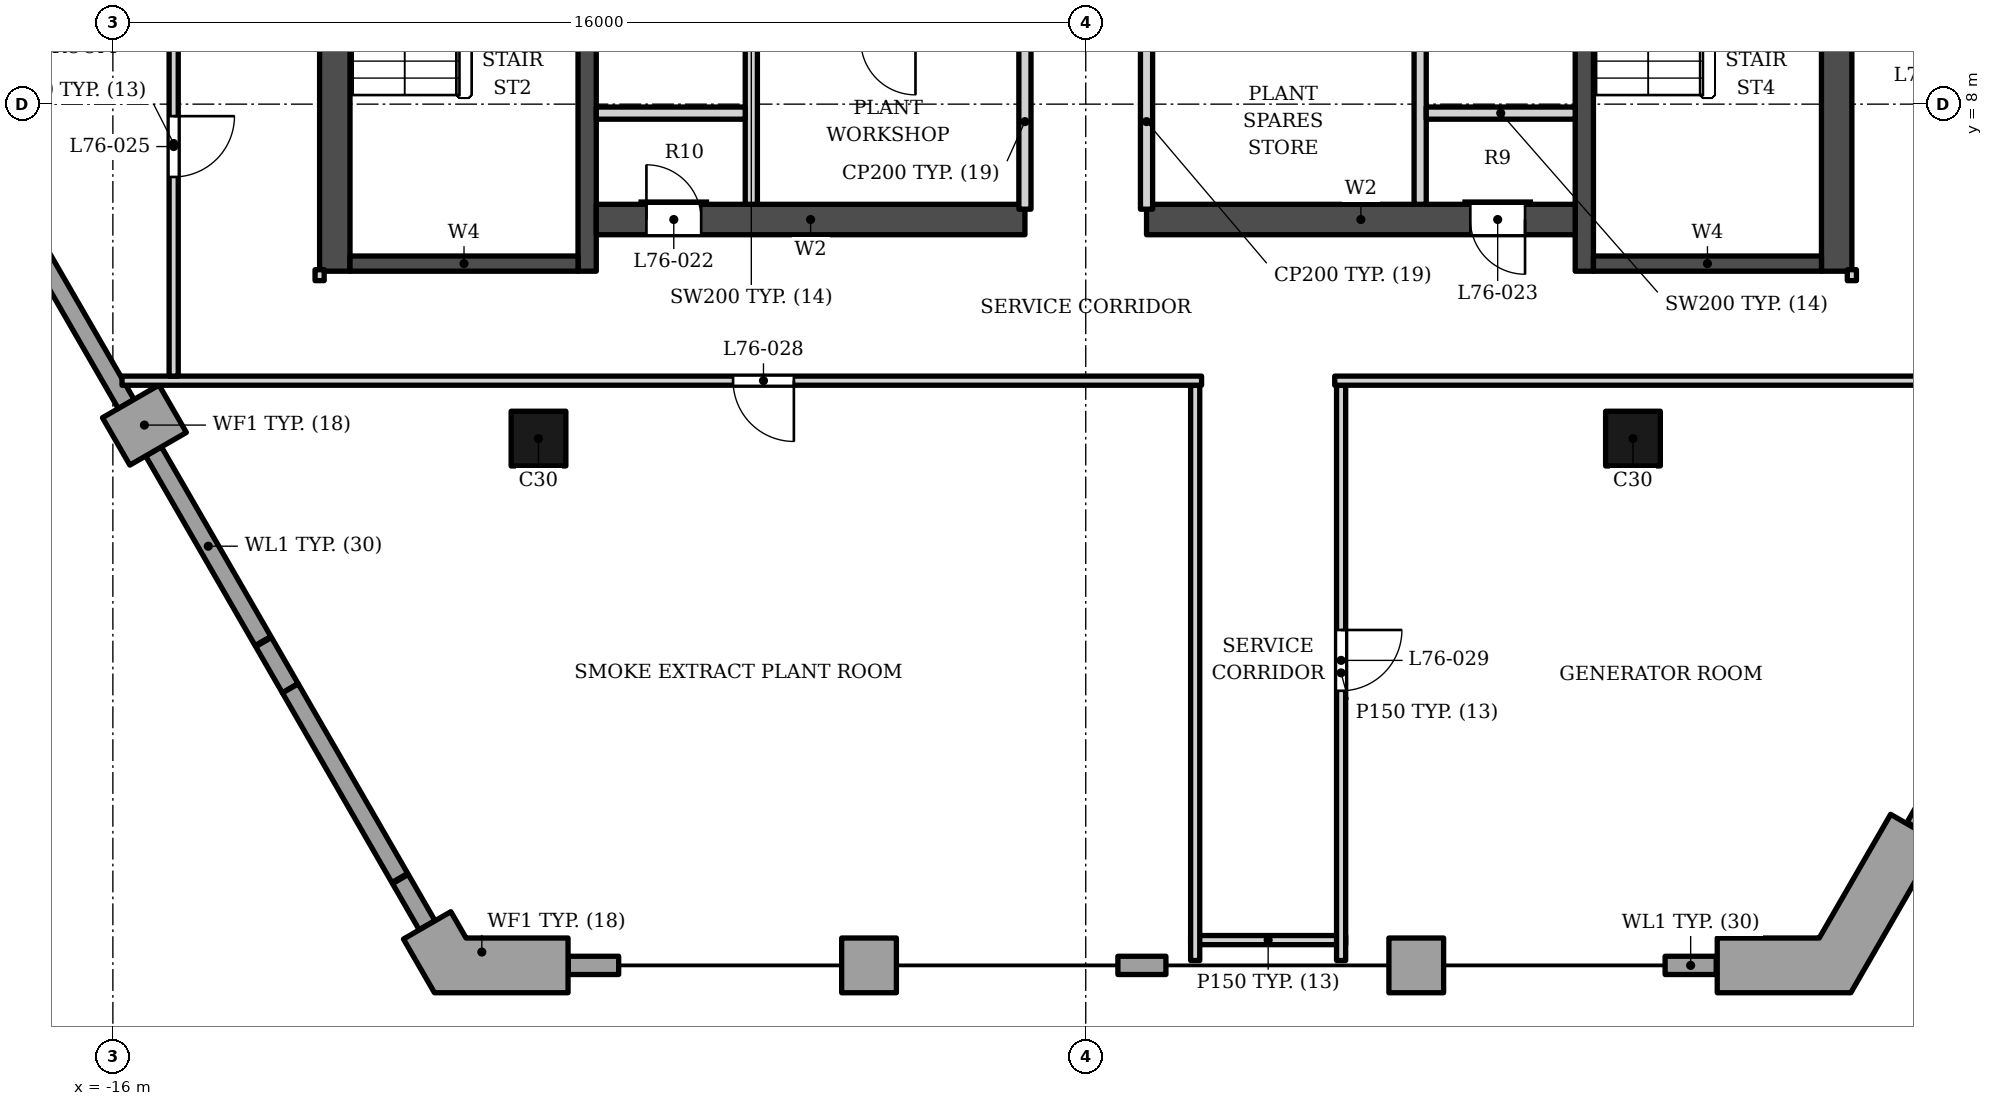
"""IFC4 building model, lengths in metres.
Left out: names, types, materials, properties, quantities, classifications, styles, units other than length and angle.
Written with IfcOpenShell. Run it as: python <this file> out.ifc"""

import sys

from ifc_helpers import new_model, si_unit, direction, frame, frame_2d, origin, origin_2d, place, context, subcontext, project, spatial, polyline, rectangle, outline, extrude, element, fill, save


model = new_model("IFC4")
c1 = context("Model", 3, precision=1e-05, world=origin(), true_north=direction((0.0, 1.0)))
c2 = subcontext(c1, "Body", "Model", "MODEL_VIEW")
j1 = project(units=[si_unit("LENGTHUNIT", "METRE"), si_unit("PLANEANGLEUNIT", "RADIAN")], contexts=[c1])
p1 = place(None, origin())
s1 = spatial("IfcSite", under=j1, at=p1, CompositionType="ELEMENT")
p2 = place(p1, origin())
s2 = spatial("IfcBuilding", under=s1, at=p2, CompositionType="ELEMENT")
p3 = place(p2, frame((0.0, 0.0, 325.5)))
s3 = spatial("IfcBuildingStorey", under=s2, at=p3, CompositionType="ELEMENT", Elevation=325.5)
p4 = place(p3, frame((-12.35, 5.253, 0.0), z_axis=(0.0, 0.0, 1.0), x_axis=(0.0, 1.0, 0.0)))
e1 = element("IfcWall", 1, at=p4, inside=s3, PredefinedType="SHEAR", context=c2, shape_type="SweptSolid", body=[
    extrude(rectangle(XDim=13.8, YDim=0.5, at=frame_2d((6.9, 0.0))), origin(), (0.0, 0.0, 1.0), 5.0),
])
p5 = place(p4, frame((7.2, 0.0, 0.0)))
e2 = element("IfcOpeningElement", 2, at=p5, cuts=e1, PredefinedType="OPENING", context=c2, shape_type="SweptSolid", body=[
    extrude(rectangle(XDim=1.2, YDim=2.1, at=frame_2d((0.6, 1.05))), frame((0.0, 0.26, 0.0), z_axis=(0.0, -1.0, 0.0), x_axis=(1.0, 0.0, 0.0)), (0.0, 0.0, 1.0), 0.52),
])
p6 = place(p4, frame((5.15, 0.0, 0.0)))
e3 = element("IfcOpeningElement", 3, at=p6, cuts=e1, PredefinedType="OPENING", context=c2, shape_type="SweptSolid", body=[
    extrude(rectangle(XDim=1.2, YDim=2.1, at=frame_2d((0.6, 1.05))), frame((0.0, 0.26, 0.0), z_axis=(0.0, -1.0, 0.0), x_axis=(1.0, 0.0, 0.0)), (0.0, 0.0, 1.0), 0.52),
])
p7 = place(p3, frame((-8.2, 5.253, 0.0), z_axis=(0.0, 0.0, 1.0), x_axis=(0.0, 1.0, 0.0)))
e4 = element("IfcWall", 4, at=p7, inside=s3, PredefinedType="SHEAR", context=c2, shape_type="SweptSolid", body=[
    extrude(rectangle(XDim=13.3, YDim=0.3, at=frame_2d((6.65, 0.0))), origin(), (0.0, 0.0, 1.0), 5.0),
])
p8 = place(p7, frame((7.1, 0.0, 0.0)))
e5 = element("IfcOpeningElement", 5, at=p8, cuts=e4, PredefinedType="OPENING", context=c2, shape_type="SweptSolid", body=[
    extrude(rectangle(XDim=1.4, YDim=2.1, at=frame_2d((0.7, 1.05))), frame((0.0, 0.16, 0.0), z_axis=(0.0, -1.0, 0.0), x_axis=(1.0, 0.0, 0.0)), (0.0, 0.0, 1.0), 0.32),
])
p9 = place(p7, frame((5.05, 0.0, 0.0)))
e6 = element("IfcOpeningElement", 6, at=p9, cuts=e4, PredefinedType="OPENING", context=c2, shape_type="SweptSolid", body=[
    extrude(rectangle(XDim=1.4, YDim=2.1, at=frame_2d((0.7, 1.05))), frame((0.0, 0.16, 0.0), z_axis=(0.0, -1.0, 0.0), x_axis=(1.0, 0.0, 0.0)), (0.0, 0.0, 1.0), 0.32),
])
p10 = place(p3, frame((-12.1, 5.378, 0.0), z_axis=(0.0, 0.0, 1.0), x_axis=(1.0, 0.0, 0.0)))
e7 = element("IfcWall", 7, at=p10, inside=s3, PredefinedType="SHEAR", context=c2, shape_type="SweptSolid", body=[
    extrude(rectangle(XDim=3.75, YDim=0.25, at=frame_2d((1.875, 0.0))), origin(), (0.0, 0.0, 1.0), 5.0),
])
p11 = place(p3, frame((12.35, 5.253, 0.0), z_axis=(0.0, 0.0, 1.0), x_axis=(0.0, 1.0, 0.0)))
e8 = element("IfcWall", 8, at=p11, inside=s3, PredefinedType="SHEAR", context=c2, shape_type="SweptSolid", body=[
    extrude(rectangle(XDim=13.8, YDim=0.5, at=frame_2d((6.9, 0.0))), origin(), (0.0, 0.0, 1.0), 5.0),
])
p12 = place(p11, frame((7.2, 0.0, 0.0)))
e9 = element("IfcOpeningElement", 9, at=p12, cuts=e8, PredefinedType="OPENING", context=c2, shape_type="SweptSolid", body=[
    extrude(rectangle(XDim=1.2, YDim=2.1, at=frame_2d((0.6, 1.05))), frame((0.0, 0.26, 0.0), z_axis=(0.0, -1.0, 0.0), x_axis=(1.0, 0.0, 0.0)), (0.0, 0.0, 1.0), 0.52),
])
p13 = place(p11, frame((5.15, 0.0, 0.0)))
e10 = element("IfcOpeningElement", 10, at=p13, cuts=e8, PredefinedType="OPENING", context=c2, shape_type="SweptSolid", body=[
    extrude(rectangle(XDim=1.2, YDim=2.1, at=frame_2d((0.6, 1.05))), frame((0.0, 0.26, 0.0), z_axis=(0.0, -1.0, 0.0), x_axis=(1.0, 0.0, 0.0)), (0.0, 0.0, 1.0), 0.52),
])
p14 = place(p3, frame((8.2, 5.253, 0.0), z_axis=(0.0, 0.0, 1.0), x_axis=(0.0, 1.0, 0.0)))
e11 = element("IfcWall", 11, at=p14, inside=s3, PredefinedType="SHEAR", context=c2, shape_type="SweptSolid", body=[
    extrude(rectangle(XDim=13.3, YDim=0.3, at=frame_2d((6.65, 0.0))), origin(), (0.0, 0.0, 1.0), 5.0),
])
p15 = place(p14, frame((7.1, 0.0, 0.0)))
e12 = element("IfcOpeningElement", 12, at=p15, cuts=e11, PredefinedType="OPENING", context=c2, shape_type="SweptSolid", body=[
    extrude(rectangle(XDim=1.4, YDim=2.1, at=frame_2d((0.7, 1.05))), frame((0.0, 0.16, 0.0), z_axis=(0.0, -1.0, 0.0), x_axis=(1.0, 0.0, 0.0)), (0.0, 0.0, 1.0), 0.32),
])
p16 = place(p14, frame((5.05, 0.0, 0.0)))
e13 = element("IfcOpeningElement", 13, at=p16, cuts=e11, PredefinedType="OPENING", context=c2, shape_type="SweptSolid", body=[
    extrude(rectangle(XDim=1.4, YDim=2.1, at=frame_2d((0.7, 1.05))), frame((0.0, 0.16, 0.0), z_axis=(0.0, -1.0, 0.0), x_axis=(1.0, 0.0, 0.0)), (0.0, 0.0, 1.0), 0.32),
])
p17 = place(p3, frame((8.35, 5.378, 0.0), z_axis=(0.0, 0.0, 1.0), x_axis=(1.0, 0.0, 0.0)))
e14 = element("IfcWall", 14, at=p17, inside=s3, PredefinedType="SHEAR", context=c2, shape_type="SweptSolid", body=[
    extrude(rectangle(XDim=3.75, YDim=0.25, at=frame_2d((1.875, 0.0))), origin(), (0.0, 0.0, 1.0), 5.0),
])
p18 = place(p3, frame((-8.05, 6.103, 0.0), z_axis=(0.0, 0.0, 1.0), x_axis=(1.0, 0.0, 0.0)))
e15 = element("IfcWall", 15, at=p18, inside=s3, PredefinedType="SHEAR", context=c2, shape_type="SweptSolid", body=[
    extrude(rectangle(XDim=7.05, YDim=0.5, at=frame_2d((3.525, 0.0))), origin(), (0.0, 0.0, 1.0), 5.0),
])
p19 = place(p18, frame((0.825, 0.0, 0.0)))
e16 = element("IfcOpeningElement", 16, at=p19, cuts=e15, PredefinedType="OPENING", context=c2, shape_type="SweptSolid", body=[
    extrude(rectangle(XDim=0.9, YDim=2.1, at=frame_2d((0.45, 1.05))), frame((0.0, 0.26, 0.0), z_axis=(0.0, -1.0, 0.0), x_axis=(1.0, 0.0, 0.0)), (0.0, 0.0, 1.0), 0.52),
])
p20 = place(p3, frame((1.0, 6.103, 0.0), z_axis=(0.0, 0.0, 1.0), x_axis=(1.0, 0.0, 0.0)))
e17 = element("IfcWall", 17, at=p20, inside=s3, PredefinedType="SHEAR", context=c2, shape_type="SweptSolid", body=[
    extrude(rectangle(XDim=7.05, YDim=0.5, at=frame_2d((3.525, 0.0))), origin(), (0.0, 0.0, 1.0), 5.0),
])
p21 = place(p20, frame((5.325, 0.0, 0.0)))
e18 = element("IfcOpeningElement", 18, at=p21, cuts=e17, PredefinedType="OPENING", context=c2, shape_type="SweptSolid", body=[
    extrude(rectangle(XDim=0.9, YDim=2.1, at=frame_2d((0.45, 1.05))), frame((0.0, 0.26, 0.0), z_axis=(0.0, -1.0, 0.0), x_axis=(1.0, 0.0, 0.0)), (0.0, 0.0, 1.0), 0.52),
])
for number, where, z_axis, x_axis in (
    (19, (-9.0, 2.5, 0.0), (0.0, 0.0, 1.0), (1.0, 0.0, 0.0)),
    (20, (9.0, 2.5, 0.0), (0.0, 0.0, 1.0), (1.0, 0.0, 0.0)),
):
    element("IfcColumn", number, at=place(p3, frame(where, z_axis=z_axis, x_axis=x_axis)), inside=s3, PredefinedType="COLUMN", context=c2, shape_type="SweptSolid", body=[
        extrude(rectangle(XDim=0.9, YDim=0.9, at=origin_2d()), origin(), (0.0, 0.0, 1.0), 5.0),
    ])
p22 = place(p3, frame((-15.946, 2.454, 0.0), z_axis=(0.0, 0.0, 1.0), x_axis=(0.86613636825, 0.499807754637, 0.0)))
e21 = element("IfcWall", 21, at=p22, inside=s3, PredefinedType="SOLIDWALL", context=c2, shape_type="SweptSolid", body=[
    extrude(rectangle(XDim=1.074, YDim=0.9, at=frame_2d((0.537, 0.0))), origin(), (0.0, 0.0, 1.0), 3.8),
])
p23 = place(p3, origin())
e22 = element("IfcWall", 22, at=p23, inside=s3, PredefinedType="ELEMENTEDWALL", context=c2, shape_type="SweptSolid", body=[
    extrude(outline(polyline([(-15.651, 3.144), (-17.307, 6.011), (-17.567, 5.861), (-15.911, 2.994), (-15.651, 3.144)])), origin(), (0.0, 0.0, 1.0), 3.8),
])
for number, where, z_axis, x_axis in (
    (23, (-15.331, 2.289, 0.0), (0.0, 0.0, 1.0), (0.5, -0.866, 0.0)),
    (24, (-13.081, -1.608, 0.0), (0.0, 0.0, 1.0), (0.5, -0.866, 0.0)),
):
    element("IfcWall", number, at=place(p3, frame(where, z_axis=z_axis, x_axis=x_axis)), inside=s3, PredefinedType="ELEMENTEDWALL", context=c2, shape_type="SweptSolid", body=[
        extrude(rectangle(XDim=3.6, YDim=0.3, at=frame_2d((1.8, 0.0))), origin(), (0.0, 0.0, 1.0), 3.8),
    ])
p24 = place(p3, origin())
e25 = element("IfcWall", 25, at=p24, inside=s3, PredefinedType="SOLIDWALL", context=c2, shape_type="SweptSolid", body=[
    extrude(outline(polyline([(-3.114, -5.713), (-4.014, -5.713), (-4.014, -6.613), (-3.114, -6.613), (-3.114, -5.713)])), origin(), (0.0, 0.0, 1.0), 3.297),
])
p25 = place(p3, origin())
e26 = element("IfcWall", 26, at=p25, inside=s3, PredefinedType="SOLIDWALL", context=c2, shape_type="SweptSolid", body=[
    extrude(outline(polyline([(5.886, -5.713), (4.986, -5.713), (4.986, -6.613), (5.886, -6.613), (5.886, -5.713)])), origin(), (0.0, 0.0, 1.0), 3.297),
])
p26 = place(p3, origin())
e27 = element("IfcWall", 27, at=p26, inside=s3, PredefinedType="SOLIDWALL", context=c2, shape_type="SweptSolid", body=[
    extrude(outline(polyline([(-10.442, -5.28), (-11.221, -5.73), (-10.711, -6.613), (-8.514, -6.613), (-8.514, -5.713), (-10.191, -5.713), (-10.442, -5.28)])), origin(), (0.0, 0.0, 1.0), 3.297),
])
p27 = place(p3, origin())
e28 = element("IfcWall", 28, at=p27, inside=s3, PredefinedType="SOLIDWALL", context=c2, shape_type="SweptSolid", body=[
    extrude(outline(polyline([(10.386, -5.713), (10.386, -6.613), (12.583, -6.613), (14.017, -4.129), (13.238, -3.679), (12.063, -5.713), (10.386, -5.713)])), origin(), (0.0, 0.0, 1.0), 3.297),
])
for number, where, z_axis, x_axis in (
    (29, (-13.521, -0.846, 0.0), (0.0, 0.0, 1.0), (0.5, -0.866, 0.0)),
    (30, (-11.271, -4.743, 0.0), (0.0, 0.0, 1.0), (0.5, -0.866, 0.0)),
):
    element("IfcWall", number, at=place(p3, frame(where, z_axis=z_axis, x_axis=x_axis)), inside=s3, PredefinedType="ELEMENTEDWALL", context=c2, shape_type="SweptSolid", body=[
        extrude(rectangle(XDim=0.876, YDim=0.3, at=frame_2d((0.438, 0.0))), origin(), (0.0, 0.0, 1.0), 3.8),
    ])
p28 = place(p3, frame((-8.51, -6.163, 0.0), z_axis=(0.0, 0.0, 1.0), x_axis=(1.0, 0.0, 0.0)))
e31 = element("IfcWall", 31, at=p28, inside=s3, PredefinedType="ELEMENTEDWALL", context=c2, shape_type="SweptSolid", body=[
    extrude(rectangle(XDim=0.829, YDim=0.3, at=frame_2d((0.414, 0.0))), origin(), (0.0, 0.0, 1.0), 3.279),
])
p29 = place(p3, frame((0.529, -6.163, 0.0), z_axis=(0.0, 0.0, 1.0), x_axis=(1.0, 0.0, 0.0)))
e32 = element("IfcWall", 32, at=p29, inside=s3, PredefinedType="ELEMENTEDWALL", context=c2, shape_type="SweptSolid", body=[
    extrude(rectangle(XDim=0.79, YDim=0.3, at=frame_2d((0.395, 0.0))), origin(), (0.0, 0.0, 1.0), 3.279),
])
p30 = place(p3, frame((9.529, -6.163, 0.0), z_axis=(0.0, 0.0, 1.0), x_axis=(1.0, 0.0, 0.0)))
e33 = element("IfcWall", 33, at=p30, inside=s3, PredefinedType="ELEMENTEDWALL", context=c2, shape_type="SweptSolid", body=[
    extrude(rectangle(XDim=0.84, YDim=0.3, at=frame_2d((0.42, 0.0))), origin(), (0.0, 0.0, 1.0), 3.279),
])
p31 = place(p3, frame((13.638, -3.885, 0.0), z_axis=(0.0, 0.0, 1.0), x_axis=(0.499923923456, 0.866069322143, 0.0)))
e34 = element("IfcWall", 34, at=p31, inside=s3, PredefinedType="ELEMENTEDWALL", context=c2, shape_type="SweptSolid", body=[
    extrude(rectangle(XDim=0.874, YDim=0.3, at=frame_2d((0.437, 0.0))), origin(), (0.0, 0.0, 1.0), 3.8),
])
for number, where, z_axis, x_axis in (
    (35, (-1.0, 6.273, 0.0), (0.0, 0.0, 1.0), (0.0, 1.0, 0.0)),
    (36, (1.0, 6.273, 0.0), (0.0, 0.0, 1.0), (0.0, 1.0, 0.0)),
):
    element("IfcWall", number, at=place(p3, frame(where, z_axis=z_axis, x_axis=x_axis)), inside=s3, PredefinedType="PARTITIONING", context=c2, shape_type="SweptSolid", body=[
        extrude(rectangle(XDim=2.88, YDim=0.2, at=frame_2d((1.44, 0.0))), origin(), (0.0, 0.0, 1.0), 4.8),
    ])
p32 = place(p3, frame((-5.5, 6.353, 0.0), z_axis=(0.0, 0.0, 1.0), x_axis=(0.0, 1.0, 0.0)))
e37 = element("IfcWall", 37, at=p32, inside=s3, PredefinedType="SOLIDWALL", context=c2, shape_type="SweptSolid", body=[
    extrude(rectangle(XDim=7.85, YDim=0.2, at=frame_2d((3.925, 0.0))), origin(), (0.0, 0.0, 1.0), 4.8),
])
p33 = place(p32, frame((3.6, 0.0, 0.0)))
e38 = element("IfcOpeningElement", 38, at=p33, cuts=e37, PredefinedType="OPENING", context=c2, shape_type="SweptSolid", body=[
    extrude(rectangle(XDim=1.4, YDim=2.1, at=frame_2d((0.7, 1.05))), frame((0.0, 0.11, 0.0), z_axis=(0.0, -1.0, 0.0), x_axis=(1.0, 0.0, 0.0)), (0.0, 0.0, 1.0), 0.22),
])
p34 = place(p3, frame((5.5, 6.353, 0.0), z_axis=(0.0, 0.0, 1.0), x_axis=(0.0, 1.0, 0.0)))
e39 = element("IfcWall", 39, at=p34, inside=s3, PredefinedType="SOLIDWALL", context=c2, shape_type="SweptSolid", body=[
    extrude(rectangle(XDim=7.85, YDim=0.2, at=frame_2d((3.925, 0.0))), origin(), (0.0, 0.0, 1.0), 4.8),
])
p35 = place(p34, frame((3.6, 0.0, 0.0)))
e40 = element("IfcOpeningElement", 40, at=p35, cuts=e39, PredefinedType="OPENING", context=c2, shape_type="SweptSolid", body=[
    extrude(rectangle(XDim=1.4, YDim=2.1, at=frame_2d((0.7, 1.05))), frame((0.0, 0.11, 0.0), z_axis=(0.0, -1.0, 0.0), x_axis=(1.0, 0.0, 0.0)), (0.0, 0.0, 1.0), 0.22),
])
for number, where, z_axis, x_axis in (
    (41, (-8.05, 7.853, 0.0), (0.0, 0.0, 1.0), (1.0, 0.0, 0.0)),
    (42, (5.6, 7.853, 0.0), (0.0, 0.0, 1.0), (1.0, 0.0, 0.0)),
):
    element("IfcWall", number, at=place(p3, frame(where, z_axis=z_axis, x_axis=x_axis)), inside=s3, PredefinedType="SOLIDWALL", context=c2, shape_type="SweptSolid", body=[
        extrude(rectangle(XDim=2.45, YDim=0.2, at=frame_2d((1.225, 0.0))), origin(), (0.0, 0.0, 1.0), 4.8),
    ])
p36 = place(p3, frame((1.725, -5.747, 0.0), z_axis=(0.0, 0.0, 1.0), x_axis=(1.0, 0.0, 0.0)))
e43 = element("IfcWall", 43, at=p36, inside=s3, PredefinedType="PARTITIONING", context=c2, shape_type="SweptSolid", body=[
    extrude(rectangle(XDim=2.55, YDim=0.15, at=frame_2d((1.275, 0.0))), origin(), (0.0, 0.0, 1.0), 3.961),
])
p37 = place(p3, frame((1.8, -6.083, 0.0), z_axis=(0.0, 0.0, 1.0), x_axis=(0.0, 1.0, 0.0)))
e44 = element("IfcWall", 44, at=p37, inside=s3, PredefinedType="PARTITIONING", context=c2, shape_type="SweptSolid", body=[
    extrude(outline(polyline([(0.0, 0.0), (9.461, 0.0), (9.461, 4.8), (1.261, 4.8), (0.0, 3.742), (0.0, 0.0)])), frame((0.0, 0.075, 0.0), z_axis=(0.0, -1.0, 0.0), x_axis=(1.0, 0.0, 0.0)), (0.0, 0.0, 1.0), 0.15),
])
p38 = place(p3, frame((4.2, -6.083, 0.0), z_axis=(0.0, 0.0, 1.0), x_axis=(0.0, 1.0, 0.0)))
e45 = element("IfcWall", 45, at=p38, inside=s3, PredefinedType="PARTITIONING", context=c2, shape_type="SweptSolid", body=[
    extrude(outline(polyline([(0.0, 0.0), (9.461, 0.0), (9.461, 4.8), (1.261, 4.8), (0.0, 3.742), (0.0, 0.0)])), frame((0.0, 0.075, 0.0), z_axis=(0.0, -1.0, 0.0), x_axis=(1.0, 0.0, 0.0)), (0.0, 0.0, 1.0), 0.15),
])
p39 = place(p38, frame((4.436, 0.0, 0.0)))
e46 = element("IfcOpeningElement", 46, at=p39, cuts=e45, PredefinedType="OPENING", context=c2, shape_type="SweptSolid", body=[
    extrude(rectangle(XDim=1.0, YDim=2.1, at=frame_2d((0.5, 1.05))), frame((0.0, 0.085, 0.0), z_axis=(0.0, -1.0, 0.0), x_axis=(1.0, 0.0, 0.0)), (0.0, 0.0, 1.0), 0.17),
])
p40 = place(p3, frame((-15.85, 3.453, 0.0), z_axis=(0.0, 0.0, 1.0), x_axis=(1.0, 0.0, 0.0)))
e47 = element("IfcWall", 47, at=p40, inside=s3, PredefinedType="PARTITIONING", context=c2, shape_type="SweptSolid", body=[
    extrude(rectangle(XDim=17.755, YDim=0.15, at=frame_2d((8.877, 0.0))), origin(), (0.0, 0.0, 1.0), 4.402),
])
p41 = place(p40, frame((10.05, 0.0, 0.0)))
e48 = element("IfcOpeningElement", 48, at=p41, cuts=e47, PredefinedType="OPENING", context=c2, shape_type="SweptSolid", body=[
    extrude(rectangle(XDim=1.0, YDim=2.1, at=frame_2d((0.5, 1.05))), frame((0.0, 0.085, 0.0), z_axis=(0.0, -1.0, 0.0), x_axis=(1.0, 0.0, 0.0)), (0.0, 0.0, 1.0), 0.17),
])
p42 = place(p3, frame((4.095, 3.453, 0.0), z_axis=(0.0, 0.0, 1.0), x_axis=(1.0, 0.0, 0.0)))
e49 = element("IfcWall", 49, at=p42, inside=s3, PredefinedType="PARTITIONING", context=c2, shape_type="SweptSolid", body=[
    extrude(rectangle(XDim=13.627, YDim=0.15, at=frame_2d((6.813, 0.0))), origin(), (0.0, 0.0, 1.0), 4.402),
])
p43 = place(p3, frame((-15.0, 3.528, 0.0), z_axis=(0.0, 0.0, 1.0), x_axis=(0.0, 1.0, 0.0)))
e50 = element("IfcWall", 50, at=p43, inside=s3, PredefinedType="PARTITIONING", context=c2, shape_type="SweptSolid", body=[
    extrude(rectangle(XDim=7.65, YDim=0.15, at=frame_2d((3.825, 0.0))), origin(), (0.0, 0.0, 1.0), 4.02),
])
p44 = place(p43, frame((3.275, 0.0, 0.0)))
e51 = element("IfcOpeningElement", 51, at=p44, cuts=e50, PredefinedType="OPENING", context=c2, shape_type="SweptSolid", body=[
    extrude(rectangle(XDim=1.0, YDim=2.1, at=frame_2d((0.5, 1.05))), frame((0.0, 0.085, 0.0), z_axis=(0.0, -1.0, 0.0), x_axis=(1.0, 0.0, 0.0)), (0.0, 0.0, 1.0), 0.17),
])
for number, where, z_axis, x_axis in (
    (52, (-12.6, 5.098, 0.0), (0.0, 0.0, 1.0), (0.0, 1.0, 0.0)),
    (53, (12.6, 5.098, 0.0), (0.0, 0.0, 1.0), (0.0, 1.0, 0.0)),
):
    element("IfcWall", number, at=place(p3, frame(where, z_axis=z_axis, x_axis=x_axis)), inside=s3, PredefinedType="PARTITIONING", context=c2, shape_type="SweptSolid", body=[
        extrude(rectangle(XDim=0.18, YDim=0.15, at=frame_2d((0.09, 0.0))), origin(), (0.0, 0.0, 1.0), 4.8),
    ])
p45 = place(p19, origin())
e54 = element("IfcDoor", 54, at=p45, inside=s3, OperationType="SINGLE_SWING_LEFT", PredefinedType="DOOR", context=c2, shape_type="SweptSolid", body=[
    extrude(rectangle(XDim=0.9, YDim=2.1, at=frame_2d((0.45, 1.05))), frame((0.0, 0.025, 0.0), z_axis=(0.0, -1.0, 0.0), x_axis=(1.0, 0.0, 0.0)), (0.0, 0.0, 1.0), 0.05),
])
fill(e16, e54)
p46 = place(p21, origin())
e55 = element("IfcDoor", 55, at=p46, inside=s3, OperationType="SINGLE_SWING_RIGHT", PredefinedType="DOOR", context=c2, shape_type="SweptSolid", body=[
    extrude(rectangle(XDim=0.9, YDim=2.1, at=frame_2d((0.45, 1.05))), frame((0.0, 0.025, 0.0), z_axis=(0.0, -1.0, 0.0), x_axis=(1.0, 0.0, 0.0)), (0.0, 0.0, 1.0), 0.05),
])
fill(e18, e55)
p47 = place(p44, origin())
e56 = element("IfcDoor", 56, at=p47, inside=s3, OperationType="SINGLE_SWING_RIGHT", PredefinedType="DOOR", context=c2, shape_type="SweptSolid", body=[
    extrude(rectangle(XDim=1.0, YDim=2.1, at=frame_2d((0.5, 1.05))), frame((0.0, 0.025, 0.0), z_axis=(0.0, -1.0, 0.0), x_axis=(1.0, 0.0, 0.0)), (0.0, 0.0, 1.0), 0.05),
])
fill(e51, e56)
p48 = place(p41, origin())
e57 = element("IfcDoor", 57, at=p48, inside=s3, OperationType="SINGLE_SWING_RIGHT", PredefinedType="DOOR", context=c2, shape_type="SweptSolid", body=[
    extrude(rectangle(XDim=1.0, YDim=2.1, at=frame_2d((0.5, 1.05))), frame((0.0, 0.025, 0.0), z_axis=(0.0, -1.0, 0.0), x_axis=(1.0, 0.0, 0.0)), (0.0, 0.0, 1.0), 0.05),
])
fill(e48, e57)
p49 = place(p39, origin())
e58 = element("IfcDoor", 58, at=p49, inside=s3, OperationType="SINGLE_SWING_RIGHT", PredefinedType="DOOR", context=c2, shape_type="SweptSolid", body=[
    extrude(rectangle(XDim=1.0, YDim=2.1, at=frame_2d((0.5, 1.05))), frame((0.0, 0.025, 0.0), z_axis=(0.0, -1.0, 0.0), x_axis=(1.0, 0.0, 0.0)), (0.0, 0.0, 1.0), 0.05),
])
fill(e46, e58)
save(model, sys.argv[1])
